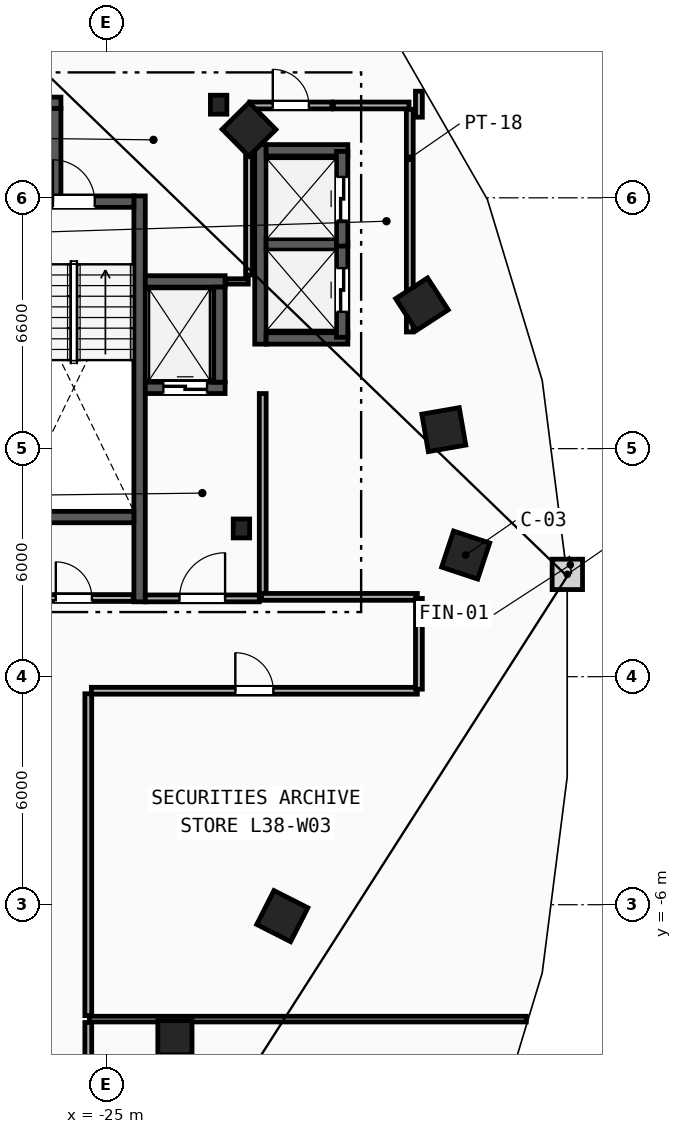
"""IFC4 building model, lengths in metres.
Left out: names, types, materials, properties, quantities, classifications, styles, units other than length and angle.
Written with IfcOpenShell. Run it as: python <this file> out.ifc"""

import sys

from ifc_helpers import new_model, si_unit, direction, frame, frame_2d, origin, origin_2d, place, context, subcontext, project, spatial, rectangle, i_section, extrude, element, fill, save


model = new_model("IFC4")
c1 = context("Model", 3, precision=1e-05, world=origin(), true_north=direction((0.0, 1.0)))
c2 = subcontext(c1, "Body", "Model", "MODEL_VIEW")
j1 = project(units=[si_unit("LENGTHUNIT", "METRE"), si_unit("PLANEANGLEUNIT", "RADIAN")], contexts=[c1])
p1 = place(None, origin())
s1 = spatial("IfcSite", under=j1, at=p1, CompositionType="ELEMENT")
p2 = place(p1, origin())
s2 = spatial("IfcBuilding", under=s1, at=p2, CompositionType="ELEMENT")
p3 = place(p2, frame((0.0, 0.0, 147.6)))
s3 = spatial("IfcBuildingStorey", under=s2, at=p3, CompositionType="ELEMENT", Elevation=147.6)
for number, where, z_axis, x_axis in (
    (1, (-21.45, 3.9, 0.0), (0.0, 0.0, 1.0), (1.0, 0.0, 0.0)),
    (2, (-22.05, 15.05, 0.0), (0.0, 0.0, 1.0), (1.0, 0.0, 0.0)),
):
    element("IfcColumn", number, at=place(p3, frame(where, z_axis=z_axis, x_axis=x_axis)), inside=s3, PredefinedType="COLUMN", context=c2, shape_type="SweptSolid", body=[
        extrude(i_section(OverallWidth=0.432, OverallDepth=0.498, WebThickness=0.056, FlangeThickness=0.089, FilletRadius=0.018, at=origin_2d()), origin(), (0.0, 0.0, 1.0), 3.6),
    ])
p4 = place(p3, frame((-23.2, -9.5, 0.0), z_axis=(0.0, 0.0, 1.0), x_axis=(1.0, 0.0, 0.0)))
e3 = element("IfcColumn", 3, at=p4, inside=s3, PredefinedType="COLUMN", context=c2, shape_type="SweptSolid", body=[
    extrude(rectangle(XDim=0.9, YDim=0.9, at=origin_2d()), origin(), (0.0, 0.0, 1.0), 3.6),
])
for number, where, z_axis, x_axis in (
    (4, (-15.55, 3.2, 0.0), (0.0, 0.0, 1.0), (0.315, 0.949, 0.0)),
    (5, (-16.125, 6.5, 0.0), (0.0, 0.0, 1.0), (-0.172, 0.985, 0.0)),
    (6, (-16.7, 9.8, 0.0), (0.0, 0.0, 1.0), (-0.544, 0.839, 0.0)),
    (7, (-21.25, 14.4, 0.0), (0.0, 0.0, 1.0), (-0.703, 0.711, 0.0)),
    (8, (-20.375, -6.3, 0.0), (0.0, 0.0, 1.0), (0.453, 0.892, 0.0)),
):
    element("IfcColumn", number, at=place(p3, frame(where, z_axis=z_axis, x_axis=x_axis)), inside=s3, PredefinedType="COLUMN", context=c2, shape_type="SweptSolid", body=[
        extrude(rectangle(XDim=1.0, YDim=1.0, at=origin_2d()), origin(), (0.0, 0.0, 1.0), 3.6),
    ])
p5 = place(p3, frame((-24.13, 1.97, 0.0), z_axis=(0.0, 0.0, 1.0), x_axis=(0.0, 1.0, 0.0)))
e9 = element("IfcWall", 9, at=p5, inside=s3, PredefinedType="SHEAR", context=c2, shape_type="SweptSolid", body=[
    extrude(rectangle(XDim=10.68, YDim=0.3, at=frame_2d((5.34, 0.0))), origin(), (0.0, 0.0, 1.0), 3.36),
])
p6 = place(p3, frame((-27.44, 12.5, 0.0), z_axis=(0.0, 0.0, 1.0), x_axis=(1.0, 0.0, 0.0)))
e10 = element("IfcWall", 10, at=p6, inside=s3, PredefinedType="SHEAR", context=c2, shape_type="SweptSolid", body=[
    extrude(rectangle(XDim=3.16, YDim=0.3, at=frame_2d((1.58, 0.0))), origin(), (0.0, 0.0, 1.0), 3.36),
])
p7 = place(p6, frame((1.03, 0.0, 0.0)))
e11 = element("IfcOpeningElement", 11, at=p7, cuts=e10, PredefinedType="OPENING", context=c2, shape_type="SweptSolid", body=[
    extrude(rectangle(XDim=1.1, YDim=2.15, at=frame_2d((0.55, 1.075))), frame((0.0, 0.16, 0.0), z_axis=(0.0, -1.0, 0.0), x_axis=(1.0, 0.0, 0.0)), (0.0, 0.0, 1.0), 0.32),
])
p8 = place(p3, frame((-27.44, 4.2, 0.0), z_axis=(0.0, 0.0, 1.0), x_axis=(1.0, 0.0, 0.0)))
e12 = element("IfcWall", 12, at=p8, inside=s3, PredefinedType="SHEAR", context=c2, shape_type="SweptSolid", body=[
    extrude(rectangle(XDim=3.16, YDim=0.3, at=frame_2d((1.58, 0.0))), origin(), (0.0, 0.0, 1.0), 3.36),
])
p9 = place(p3, frame((-20.89, 2.15, 0.0), z_axis=(0.0, 0.0, 1.0), x_axis=(0.0, 1.0, 0.0)))
e13 = element("IfcWall", 13, at=p9, inside=s3, PredefinedType="PARTITIONING", context=c2, shape_type="SweptSolid", body=[
    extrude(rectangle(XDim=5.3, YDim=0.18, at=frame_2d((2.65, 0.0))), origin(), (0.0, 0.0, 1.0), 3.36),
])
p10 = place(p3, frame((-23.98, 2.06, 0.0), z_axis=(0.0, 0.0, 1.0), x_axis=(1.0, 0.0, 0.0)))
e14 = element("IfcWall", 14, at=p10, inside=s3, PredefinedType="PARTITIONING", context=c2, shape_type="SweptSolid", body=[
    extrude(rectangle(XDim=3.0, YDim=0.18, at=frame_2d((1.5, 0.0))), origin(), (0.0, 0.0, 1.0), 3.36),
])
p11 = place(p10, frame((0.9, 0.0, 0.0)))
e15 = element("IfcOpeningElement", 15, at=p11, cuts=e14, PredefinedType="OPENING", context=c2, shape_type="SweptSolid", body=[
    extrude(rectangle(XDim=1.2, YDim=2.15, at=frame_2d((0.6, 1.075))), frame((0.0, 0.1, 0.0), z_axis=(0.0, -1.0, 0.0), x_axis=(1.0, 0.0, 0.0)), (0.0, 0.0, 1.0), 0.2),
])
p12 = place(p3, frame((-23.98, 7.6, 0.0), z_axis=(0.0, 0.0, 1.0), x_axis=(1.0, 0.0, 0.0)))
e16 = element("IfcWall", 16, at=p12, inside=s3, PredefinedType="SHEAR", context=c2, shape_type="SweptSolid", body=[
    extrude(rectangle(XDim=2.1, YDim=0.3, at=frame_2d((1.05, 0.0))), origin(), (0.0, 0.0, 1.0), 3.36),
])
p13 = place(p12, frame((0.475, 0.0, 0.0)))
e17 = element("IfcOpeningElement", 17, at=p13, cuts=e16, PredefinedType="OPENING", context=c2, shape_type="SweptSolid", body=[
    extrude(rectangle(XDim=1.15, YDim=2.2, at=frame_2d((0.575, 1.1))), frame((0.0, 0.16, 0.0), z_axis=(0.0, -1.0, 0.0), x_axis=(1.0, 0.0, 0.0)), (0.0, 0.0, 1.0), 0.32),
])
p14 = place(p3, frame((-23.98, 10.4, 0.0), z_axis=(0.0, 0.0, 1.0), x_axis=(1.0, 0.0, 0.0)))
e18 = element("IfcWall", 18, at=p14, inside=s3, PredefinedType="SHEAR", context=c2, shape_type="SweptSolid", body=[
    extrude(rectangle(XDim=2.1, YDim=0.3, at=frame_2d((1.05, 0.0))), origin(), (0.0, 0.0, 1.0), 3.36),
])
for number, where, z_axis, x_axis in (
    (19, (-22.03, 7.75, 0.0), (0.0, 0.0, 1.0), (0.0, 1.0, 0.0)),
    (20, (-28.7, 15.1, 0.0), (0.0, 0.0, 1.0), (1.0, 0.0, 0.0)),
):
    element("IfcWall", number, at=place(p3, frame(where, z_axis=z_axis, x_axis=x_axis)), inside=s3, PredefinedType="SHEAR", context=c2, shape_type="SweptSolid", body=[
        extrude(rectangle(XDim=2.5, YDim=0.3, at=frame_2d((1.25, 0.0))), origin(), (0.0, 0.0, 1.0), 3.36),
    ])
p15 = place(p3, frame((-26.35, 12.65, 0.0), z_axis=(0.0, 0.0, 1.0), x_axis=(0.0, 1.0, 0.0)))
e21 = element("IfcWall", 21, at=p15, inside=s3, PredefinedType="SHEAR", context=c2, shape_type="SweptSolid", body=[
    extrude(rectangle(XDim=2.3, YDim=0.3, at=frame_2d((1.15, 0.0))), origin(), (0.0, 0.0, 1.0), 3.36),
])
p16 = place(p3, frame((-20.95, 8.75, 0.0), z_axis=(0.0, 0.0, 1.0), x_axis=(0.0, 1.0, 0.0)))
e22 = element("IfcWall", 22, at=p16, inside=s3, PredefinedType="SHEAR", context=c2, shape_type="SweptSolid", body=[
    extrude(rectangle(XDim=5.25, YDim=0.3, at=frame_2d((2.625, 0.0))), origin(), (0.0, 0.0, 1.0), 3.36),
])
for number, where, z_axis, x_axis in (
    (23, (-20.8, 8.9, 0.0), (0.0, 0.0, 1.0), (1.0, 0.0, 0.0)),
    (24, (-20.8, 13.85, 0.0), (0.0, 0.0, 1.0), (1.0, 0.0, 0.0)),
):
    element("IfcWall", number, at=place(p3, frame(where, z_axis=z_axis, x_axis=x_axis)), inside=s3, PredefinedType="SHEAR", context=c2, shape_type="SweptSolid", body=[
        extrude(rectangle(XDim=2.15, YDim=0.3, at=frame_2d((1.075, 0.0))), origin(), (0.0, 0.0, 1.0), 3.36),
    ])
p17 = place(p3, frame((-20.8, 11.375, 0.0), z_axis=(0.0, 0.0, 1.0), x_axis=(1.0, 0.0, 0.0)))
e25 = element("IfcWall", 25, at=p17, inside=s3, PredefinedType="SHEAR", context=c2, shape_type="SweptSolid", body=[
    extrude(rectangle(XDim=1.85, YDim=0.3, at=frame_2d((0.925, 0.0))), origin(), (0.0, 0.0, 1.0), 3.36),
])
p18 = place(p3, frame((-18.8, 8.93, 0.0), z_axis=(0.0, 0.0, 1.0), x_axis=(0.0, 1.0, 0.0)))
e26 = element("IfcWall", 26, at=p18, inside=s3, PredefinedType="SHEAR", context=c2, shape_type="SweptSolid", body=[
    extrude(rectangle(XDim=2.49, YDim=0.3, at=frame_2d((1.245, 0.0))), origin(), (0.0, 0.0, 1.0), 3.36),
])
p19 = place(p18, frame((0.67, 0.0, 0.0)))
e27 = element("IfcOpeningElement", 27, at=p19, cuts=e26, PredefinedType="OPENING", context=c2, shape_type="SweptSolid", body=[
    extrude(rectangle(XDim=1.15, YDim=2.2, at=frame_2d((0.575, 1.1))), frame((0.0, 0.16, 0.0), z_axis=(0.0, -1.0, 0.0), x_axis=(1.0, 0.0, 0.0)), (0.0, 0.0, 1.0), 0.32),
])
p20 = place(p3, frame((-18.8, 11.33, 0.0), z_axis=(0.0, 0.0, 1.0), x_axis=(0.0, 1.0, 0.0)))
e28 = element("IfcWall", 28, at=p20, inside=s3, PredefinedType="SHEAR", context=c2, shape_type="SweptSolid", body=[
    extrude(rectangle(XDim=2.49, YDim=0.3, at=frame_2d((1.245, 0.0))), origin(), (0.0, 0.0, 1.0), 3.36),
])
p21 = place(p20, frame((0.67, 0.0, 0.0)))
e29 = element("IfcOpeningElement", 29, at=p21, cuts=e28, PredefinedType="OPENING", context=c2, shape_type="SweptSolid", body=[
    extrude(rectangle(XDim=1.15, YDim=2.2, at=frame_2d((0.575, 1.1))), frame((0.0, 0.16, 0.0), z_axis=(0.0, -1.0, 0.0), x_axis=(1.0, 0.0, 0.0)), (0.0, 0.0, 1.0), 0.32),
])
p22 = place(p3, frame((-17.02, 9.07, 0.0), z_axis=(0.0, 0.0, 1.0), x_axis=(0.0, 1.0, 0.0)))
e30 = element("IfcWall", 30, at=p22, inside=s3, PredefinedType="PARTITIONING", context=c2, shape_type="SweptSolid", body=[
    extrude(rectangle(XDim=5.86, YDim=0.18, at=frame_2d((2.93, 0.0))), origin(), (0.0, 0.0, 1.0), 3.36),
])
p23 = place(p3, frame((-21.23, 15.03, 0.0), z_axis=(0.0, 0.0, 1.0), x_axis=(1.0, 0.0, 0.0)))
e31 = element("IfcWall", 31, at=p23, inside=s3, PredefinedType="PARTITIONING", context=c2, shape_type="SweptSolid", body=[
    extrude(rectangle(XDim=2.16, YDim=0.18, at=frame_2d((1.08, 0.0))), origin(), (0.0, 0.0, 1.0), 3.36),
])
p24 = place(p23, frame((0.605, 0.0, 0.0)))
e32 = element("IfcOpeningElement", 32, at=p24, cuts=e31, PredefinedType="OPENING", context=c2, shape_type="SweptSolid", body=[
    extrude(rectangle(XDim=0.95, YDim=2.1, at=frame_2d((0.475, 1.05))), frame((0.0, 0.1, 0.0), z_axis=(0.0, -1.0, 0.0), x_axis=(1.0, 0.0, 0.0)), (0.0, 0.0, 1.0), 0.2),
])
p25 = place(p3, frame((-19.03, 15.03, 0.0), z_axis=(0.0, 0.0, 1.0), x_axis=(1.0, 0.0, 0.0)))
e33 = element("IfcWall", 33, at=p25, inside=s3, PredefinedType="PARTITIONING", context=c2, shape_type="SweptSolid", body=[
    extrude(rectangle(XDim=1.99, YDim=0.18, at=frame_2d((0.995, 0.0))), origin(), (0.0, 0.0, 1.0), 3.36),
])
p26 = place(p3, frame((-21.86, 10.4, 0.0), z_axis=(0.0, 0.0, 1.0), x_axis=(1.0, 0.0, 0.0)))
e34 = element("IfcWall", 34, at=p26, inside=s3, PredefinedType="PARTITIONING", context=c2, shape_type="SweptSolid", body=[
    extrude(rectangle(XDim=0.59, YDim=0.14, at=frame_2d((0.295, 0.0))), origin(), (0.0, 0.0, 1.0), 3.36),
])
p27 = place(p3, frame((-21.25, 10.57, 0.0), z_axis=(0.0, 0.0, 1.0), x_axis=(0.0, 1.0, 0.0)))
e35 = element("IfcWall", 35, at=p27, inside=s3, PredefinedType="PARTITIONING", context=c2, shape_type="SweptSolid", body=[
    extrude(rectangle(XDim=4.36, YDim=0.18, at=frame_2d((2.18, 0.0))), origin(), (0.0, 0.0, 1.0), 3.36),
])
p28 = place(p3, frame((-27.42, 2.07, 0.0), z_axis=(0.0, 0.0, 1.0), x_axis=(1.0, 0.0, 0.0)))
e36 = element("IfcWall", 36, at=p28, inside=s3, PredefinedType="PARTITIONING", context=c2, shape_type="SweptSolid", body=[
    extrude(rectangle(XDim=3.12, YDim=0.18, at=frame_2d((1.56, 0.0))), origin(), (0.0, 0.0, 1.0), 3.36),
])
p29 = place(p28, frame((1.085, 0.0, 0.0)))
e37 = element("IfcOpeningElement", 37, at=p29, cuts=e36, PredefinedType="OPENING", context=c2, shape_type="SweptSolid", body=[
    extrude(rectangle(XDim=0.95, YDim=2.1, at=frame_2d((0.475, 1.05))), frame((0.0, 0.1, 0.0), z_axis=(0.0, -1.0, 0.0), x_axis=(1.0, 0.0, 0.0)), (0.0, 0.0, 1.0), 0.2),
])
p30 = place(p3, frame((-25.45, -9.01, 0.0), z_axis=(0.0, 0.0, 1.0), x_axis=(1.0, 0.0, 0.0)))
e38 = element("IfcWall", 38, at=p30, inside=s3, PredefinedType="PARTITIONING", context=c2, shape_type="SweptSolid", body=[
    extrude(rectangle(XDim=11.495, YDim=0.15, at=frame_2d((5.748, 0.0))), origin(), (0.0, 0.0, 1.0), 3.36),
])
p31 = place(p3, frame((-25.48, -11.178, 0.0), z_axis=(0.0, 0.0, 1.0), x_axis=(0.0, 1.0, 0.0)))
e39 = element("IfcWall", 39, at=p31, inside=s3, PredefinedType="PARTITIONING", context=c2, shape_type="SweptSolid", body=[
    extrude(rectangle(XDim=2.078, YDim=0.18, at=frame_2d((1.039, 0.0))), origin(), (0.0, 0.0, 1.0), 3.36),
])
p32 = place(p3, frame((-25.4, -0.37, 0.0), z_axis=(0.0, 0.0, 1.0), x_axis=(1.0, 0.0, 0.0)))
e40 = element("IfcWall", 40, at=p32, inside=s3, PredefinedType="PARTITIONING", context=c2, shape_type="SweptSolid", body=[
    extrude(rectangle(XDim=8.578, YDim=0.18, at=frame_2d((4.289, 0.0))), origin(), (0.0, 0.0, 1.0), 3.36),
])
p33 = place(p32, frame((3.789, 0.0, 0.0)))
e41 = element("IfcOpeningElement", 41, at=p33, cuts=e40, PredefinedType="OPENING", context=c2, shape_type="SweptSolid", body=[
    extrude(rectangle(XDim=1.0, YDim=2.15, at=frame_2d((0.5, 1.075))), frame((0.0, 0.1, 0.0), z_axis=(0.0, -1.0, 0.0), x_axis=(1.0, 0.0, 0.0)), (0.0, 0.0, 1.0), 0.2),
])
p34 = place(p3, frame((-25.48, -8.92, 0.0), z_axis=(0.0, 0.0, 1.0), x_axis=(0.0, 1.0, 0.0)))
e42 = element("IfcWall", 42, at=p34, inside=s3, PredefinedType="PARTITIONING", context=c2, shape_type="SweptSolid", body=[
    extrude(rectangle(XDim=8.47, YDim=0.18, at=frame_2d((4.235, 0.0))), origin(), (0.0, 0.0, 1.0), 3.36),
])
p35 = place(p3, frame((-16.822, 2.1, 0.0), z_axis=(0.0, 0.0, 1.0), x_axis=(-1.0, 0.0, 0.0)))
e43 = element("IfcWall", 43, at=p35, inside=s3, PredefinedType="PARTITIONING", context=c2, shape_type="SweptSolid", body=[
    extrude(rectangle(XDim=4.098, YDim=0.18, at=frame_2d((2.049, 0.0))), origin(), (0.0, 0.0, 1.0), 3.36),
])
p36 = place(p3, frame((-16.78, -0.329, 0.0), z_axis=(0.0, 0.0, 1.0), x_axis=(0.0, 1.0, 0.0)))
e44 = element("IfcWall", 44, at=p36, inside=s3, PredefinedType="PARTITIONING", context=c2, shape_type="SweptSolid", body=[
    extrude(rectangle(XDim=2.387, YDim=0.18, at=frame_2d((1.194, 0.0))), origin(), (0.0, 0.0, 1.0), 3.36),
])
p37 = place(p3, frame((-16.78, 14.721, 0.0), z_axis=(0.0, 0.0, 1.0), x_axis=(0.0, 1.0, 0.0)))
e45 = element("IfcWall", 45, at=p37, inside=s3, PredefinedType="PARTITIONING", context=c2, shape_type="SweptSolid", body=[
    extrude(rectangle(XDim=0.684, YDim=0.18, at=frame_2d((0.342, 0.0))), origin(), (0.0, 0.0, 1.0), 3.36),
])
p38 = place(p7, origin())
e46 = element("IfcDoor", 46, at=p38, inside=s3, OperationType="SINGLE_SWING_LEFT", PredefinedType="DOOR", context=c2, shape_type="SweptSolid", body=[
    extrude(rectangle(XDim=1.1, YDim=2.15, at=frame_2d((0.55, 1.075))), frame((0.0, 0.025, 0.0), z_axis=(0.0, -1.0, 0.0), x_axis=(1.0, 0.0, 0.0)), (0.0, 0.0, 1.0), 0.05),
])
fill(e11, e46)
p39 = place(p11, origin())
e47 = element("IfcDoor", 47, at=p39, inside=s3, OperationType="SINGLE_SWING_RIGHT", PredefinedType="DOOR", context=c2, shape_type="SweptSolid", body=[
    extrude(rectangle(XDim=1.2, YDim=2.15, at=frame_2d((0.6, 1.075))), frame((0.0, 0.025, 0.0), z_axis=(0.0, -1.0, 0.0), x_axis=(1.0, 0.0, 0.0)), (0.0, 0.0, 1.0), 0.05),
])
fill(e15, e47)
p40 = place(p13, origin())
e48 = element("IfcDoor", 48, at=p40, inside=s3, OperationType="SLIDING_TO_LEFT", PredefinedType="TRAPDOOR", context=c2, shape_type="SweptSolid", body=[
    extrude(rectangle(XDim=1.15, YDim=2.2, at=frame_2d((0.575, 1.1))), frame((0.0, 0.025, 0.0), z_axis=(0.0, -1.0, 0.0), x_axis=(1.0, 0.0, 0.0)), (0.0, 0.0, 1.0), 0.05),
])
fill(e17, e48)
p41 = place(p19, origin())
e49 = element("IfcDoor", 49, at=p41, inside=s3, OperationType="SLIDING_TO_LEFT", PredefinedType="TRAPDOOR", context=c2, shape_type="SweptSolid", body=[
    extrude(rectangle(XDim=1.15, YDim=2.2, at=frame_2d((0.575, 1.1))), frame((0.0, 0.025, 0.0), z_axis=(0.0, -1.0, 0.0), x_axis=(1.0, 0.0, 0.0)), (0.0, 0.0, 1.0), 0.05),
])
fill(e27, e49)
p42 = place(p21, origin())
e50 = element("IfcDoor", 50, at=p42, inside=s3, OperationType="SLIDING_TO_LEFT", PredefinedType="TRAPDOOR", context=c2, shape_type="SweptSolid", body=[
    extrude(rectangle(XDim=1.15, YDim=2.2, at=frame_2d((0.575, 1.1))), frame((0.0, 0.025, 0.0), z_axis=(0.0, -1.0, 0.0), x_axis=(1.0, 0.0, 0.0)), (0.0, 0.0, 1.0), 0.05),
])
fill(e29, e50)
p43 = place(p33, origin())
e51 = element("IfcDoor", 51, at=p43, inside=s3, OperationType="SINGLE_SWING_LEFT", PredefinedType="DOOR", context=c2, shape_type="SweptSolid", body=[
    extrude(rectangle(XDim=1.0, YDim=2.15, at=frame_2d((0.5, 1.075))), frame((0.0, 0.025, 0.0), z_axis=(0.0, -1.0, 0.0), x_axis=(1.0, 0.0, 0.0)), (0.0, 0.0, 1.0), 0.05),
])
fill(e41, e51)
p44 = place(p29, origin())
e52 = element("IfcDoor", 52, at=p44, inside=s3, OperationType="SINGLE_SWING_LEFT", PredefinedType="DOOR", context=c2, shape_type="SweptSolid", body=[
    extrude(rectangle(XDim=0.95, YDim=2.1, at=frame_2d((0.475, 1.05))), frame((0.0, 0.025, 0.0), z_axis=(0.0, -1.0, 0.0), x_axis=(1.0, 0.0, 0.0)), (0.0, 0.0, 1.0), 0.05),
])
fill(e37, e52)
p45 = place(p24, origin())
e53 = element("IfcDoor", 53, at=p45, inside=s3, OperationType="SINGLE_SWING_LEFT", PredefinedType="DOOR", context=c2, shape_type="SweptSolid", body=[
    extrude(rectangle(XDim=0.95, YDim=2.1, at=frame_2d((0.475, 1.05))), frame((0.0, 0.025, 0.0), z_axis=(0.0, -1.0, 0.0), x_axis=(1.0, 0.0, 0.0)), (0.0, 0.0, 1.0), 0.05),
])
fill(e32, e53)
save(model, sys.argv[1])
